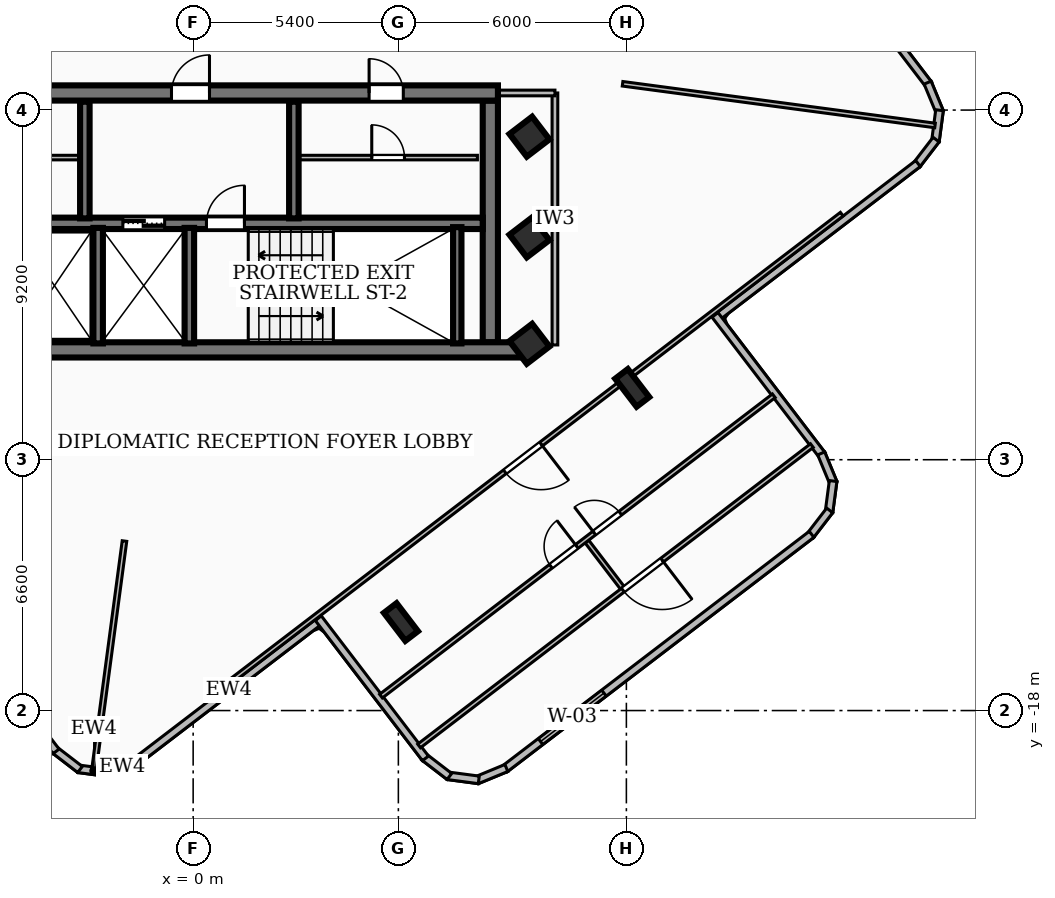
"""IFC4 building model, lengths in metres.
Left out: names, types, materials, properties, quantities, classifications, styles, units other than length and angle.
Written with IfcOpenShell. Run it as: python <this file> out.ifc"""

import sys

from ifc_helpers import new_model, si_unit, direction, frame, frame_2d, origin, origin_2d, place, context, subcontext, project, spatial, rectangle, i_section, extrude, element, fill, save


model = new_model("IFC4")
c1 = context("Model", 3, precision=1e-05, world=origin(), true_north=direction((0.0, 1.0)))
c2 = subcontext(c1, "Body", "Model", "MODEL_VIEW")
j1 = project(units=[si_unit("LENGTHUNIT", "METRE"), si_unit("PLANEANGLEUNIT", "RADIAN")], contexts=[c1])
p1 = place(None, origin())
s1 = spatial("IfcSite", under=j1, at=p1, CompositionType="ELEMENT")
p2 = place(p1, origin())
s2 = spatial("IfcBuilding", under=s1, at=p2, CompositionType="ELEMENT")
p3 = place(p2, frame((0.0, 0.0, 232.56)))
s3 = spatial("IfcBuildingStorey", under=s2, at=p3, CompositionType="ELEMENT", Elevation=232.56)
p4 = place(p3, frame((8.78, -8.51, 0.0), z_axis=(0.0, 0.0, 1.0), x_axis=(-1.0, 0.0, 0.0)))
e1 = element("IfcWall", 1, at=p4, inside=s3, PredefinedType="SHEAR", context=c2, shape_type="SweptSolid", body=[
    extrude(rectangle(XDim=17.56, YDim=0.4, at=frame_2d((8.78, 0.0))), origin(), (0.0, 0.0, 1.0), 3.14),
])
p5 = place(p3, frame((-8.02, -1.75, 0.0), z_axis=(0.0, 0.0, 1.0), x_axis=(1.0, 0.0, 0.0)))
e2 = element("IfcWall", 2, at=p5, inside=s3, PredefinedType="SHEAR", context=c2, shape_type="SweptSolid", body=[
    extrude(rectangle(XDim=16.04, YDim=0.4, at=frame_2d((8.02, 0.0))), origin(), (0.0, 0.0, 1.0), 3.14),
])
p6 = place(p5, frame((7.45, 0.0, 0.0)))
e3 = element("IfcOpeningElement", 3, at=p6, cuts=e2, PredefinedType="OPENING", context=c2, shape_type="SweptSolid", body=[
    extrude(rectangle(XDim=1.0, YDim=2.1, at=frame_2d((0.5, 1.05))), frame((0.0, 0.21, 0.0), z_axis=(0.0, -1.0, 0.0), x_axis=(1.0, 0.0, 0.0)), (0.0, 0.0, 1.0), 0.42),
])
p7 = place(p5, frame((12.65, 0.0, 0.0)))
e4 = element("IfcOpeningElement", 4, at=p7, cuts=e2, PredefinedType="OPENING", context=c2, shape_type="SweptSolid", body=[
    extrude(rectangle(XDim=0.9, YDim=2.06, at=frame_2d((0.45, 1.03))), frame((0.0, 0.21, 0.0), z_axis=(0.0, -1.0, 0.0), x_axis=(1.0, 0.0, 0.0)), (0.0, 0.0, 1.0), 0.42),
])
p8 = place(p5, frame((2.25, 0.0, 0.0)))
e5 = element("IfcOpeningElement", 5, at=p8, cuts=e2, PredefinedType="OPENING", context=c2, shape_type="SweptSolid", body=[
    extrude(rectangle(XDim=0.9, YDim=2.06, at=frame_2d((0.45, 1.03))), frame((0.0, 0.21, 0.0), z_axis=(0.0, -1.0, 0.0), x_axis=(1.0, 0.0, 0.0)), (0.0, 0.0, 1.0), 0.42),
])
p9 = place(p3, frame((7.82, -1.95, 0.0), z_axis=(0.0, 0.0, 1.0), x_axis=(0.0, -1.0, 0.0)))
e6 = element("IfcWall", 6, at=p9, inside=s3, PredefinedType="SHEAR", context=c2, shape_type="SweptSolid", body=[
    extrude(rectangle(XDim=6.36, YDim=0.4, at=frame_2d((3.18, 0.0))), origin(), (0.0, 0.0, 1.0), 3.14),
])
p10 = place(p3, frame((-7.62, -5.18, 0.0), z_axis=(0.0, 0.0, 1.0), x_axis=(1.0, 0.0, 0.0)))
e7 = element("IfcWall", 7, at=p10, inside=s3, PredefinedType="SOLIDWALL", context=c2, shape_type="SweptSolid", body=[
    extrude(rectangle(XDim=15.24, YDim=0.3, at=frame_2d((7.62, 0.0))), origin(), (0.0, 0.0, 1.0), 3.14),
])
p11 = place(p10, frame((5.77, 0.0, 0.0)))
e8 = element("IfcOpeningElement", 8, at=p11, cuts=e7, PredefinedType="OPENING", context=c2, shape_type="SweptSolid", body=[
    extrude(rectangle(XDim=1.1, YDim=2.15, at=frame_2d((0.55, 1.075))), frame((0.0, 0.16, 0.0), z_axis=(0.0, -1.0, 0.0), x_axis=(1.0, 0.0, 0.0)), (0.0, 0.0, 1.0), 0.32),
])
p12 = place(p10, frame((7.97, 0.0, 0.0)))
e9 = element("IfcOpeningElement", 9, at=p12, cuts=e7, PredefinedType="OPENING", context=c2, shape_type="SweptSolid", body=[
    extrude(rectangle(XDim=1.0, YDim=2.1, at=frame_2d((0.5, 1.05))), frame((0.0, 0.16, 0.0), z_axis=(0.0, -1.0, 0.0), x_axis=(1.0, 0.0, 0.0)), (0.0, 0.0, 1.0), 0.32),
])
p13 = place(p3, frame((6.95, -8.34, 0.0), z_axis=(0.0, 0.0, 1.0), x_axis=(0.0, 1.0, 0.0)))
e10 = element("IfcWall", 10, at=p13, inside=s3, PredefinedType="SOLIDWALL", context=c2, shape_type="SweptSolid", body=[
    extrude(rectangle(XDim=3.06, YDim=0.22, at=frame_2d((1.53, 0.0))), origin(), (0.0, 0.0, 1.0), 3.14),
])
for number, where, z_axis, x_axis in (
    (11, (-0.1, -8.34, 0.0), (0.0, 0.0, 1.0), (0.0, 1.0, 0.0)),
    (12, (-2.5, -8.34, 0.0), (0.0, 0.0, 1.0), (0.0, 1.0, 0.0)),
):
    element("IfcWall", number, at=place(p3, frame(where, z_axis=z_axis, x_axis=x_axis)), inside=s3, PredefinedType="SOLIDWALL", context=c2, shape_type="SweptSolid", body=[
        extrude(rectangle(XDim=3.04, YDim=0.25, at=frame_2d((1.52, 0.0))), origin(), (0.0, 0.0, 1.0), 3.14),
    ])
for number, where, z_axis, x_axis in (
    (13, (-2.85, -5.05, 0.0), (0.0, 0.0, 1.0), (0.0, 1.0, 0.0)),
    (14, (2.65, -5.05, 0.0), (0.0, 0.0, 1.0), (0.0, 1.0, 0.0)),
):
    element("IfcWall", number, at=place(p3, frame(where, z_axis=z_axis, x_axis=x_axis)), inside=s3, PredefinedType="SOLIDWALL", context=c2, shape_type="SweptSolid", body=[
        extrude(rectangle(XDim=3.07, YDim=0.25, at=frame_2d((1.535, 0.0))), origin(), (0.0, 0.0, 1.0), 3.14),
    ])
for number, where, z_axis, x_axis in (
    (15, (8.85, -5.55, 0.0), (0.0, 0.0, 1.0), (0.794, 0.607, 0.0)),
    (16, (8.85, -2.9, 0.0), (0.0, 0.0, 1.0), (0.794, 0.607, 0.0)),
    (17, (8.85, -8.35, 0.0), (0.0, 0.0, 1.0), (0.794, 0.607, 0.0)),
):
    element("IfcColumn", number, at=place(p3, frame(where, z_axis=z_axis, x_axis=x_axis)), inside=s3, PredefinedType="COLUMN", context=c2, shape_type="SweptSolid", body=[
        extrude(rectangle(XDim=0.75, YDim=0.75, at=origin_2d()), origin(), (0.0, 0.0, 1.0), 3.42),
    ])
for number, where, z_axis, x_axis in (
    (18, (5.468, -15.671, 0.0), (0.0, 0.0, 1.0), (0.794, 0.607, 0.0)),
    (19, (11.554, -9.51, 0.0), (0.0, 0.0, 1.0), (0.794, 0.607, 0.0)),
):
    element("IfcColumn", number, at=place(p3, frame(where, z_axis=z_axis, x_axis=x_axis)), inside=s3, PredefinedType="COLUMN", context=c2, shape_type="SweptSolid", body=[
        extrude(i_section(OverallWidth=0.418, OverallDepth=0.927, WebThickness=0.019, FlangeThickness=0.032, at=origin_2d()), origin(), (0.0, 0.0, 1.0), 3.42),
    ])
p14 = place(p3, frame((3.406, -15.584, 0.0), z_axis=(0.0, 0.0, 1.0), x_axis=(-0.794329901805, -0.60748663121, 0.0)))
e20 = element("IfcWall", 20, at=p14, inside=s3, PredefinedType="SOLIDWALL", context=c2, shape_type="SweptSolid", body=[
    extrude(rectangle(XDim=6.203, YDim=0.2, at=frame_2d((3.101, 0.0))), origin(), (0.0, 0.0, 1.0), 3.14),
])
p15 = place(p3, frame((-1.478, -19.327, 0.0), z_axis=(0.0, 0.0, 1.0), x_axis=(-0.924091394431, -0.382171551451, 0.0)))
e21 = element("IfcWall", 21, at=p15, inside=s3, PredefinedType="SOLIDWALL", context=c2, shape_type="SweptSolid", body=[
    extrude(rectangle(XDim=0.837, YDim=0.2, at=frame_2d((0.419, 0.0))), origin(), (0.0, 0.0, 1.0), 3.14),
])
p16 = place(p3, frame((-2.204, -19.64, 0.0), z_axis=(0.0, 0.0, 1.0), x_axis=(-0.99140789753, 0.130806653943, 0.0)))
e22 = element("IfcWall", 22, at=p16, inside=s3, PredefinedType="SOLIDWALL", context=c2, shape_type="SweptSolid", body=[
    extrude(rectangle(XDim=0.825, YDim=0.2, at=frame_2d((0.413, 0.0))), origin(), (0.0, 0.0, 1.0), 3.14),
])
p17 = place(p3, frame((-2.977, -19.55, 0.0), z_axis=(0.0, 0.0, 1.0), x_axis=(-0.792959338773, 0.609274558022, 0.0)))
e23 = element("IfcWall", 23, at=p17, inside=s3, PredefinedType="SOLIDWALL", context=c2, shape_type="SweptSolid", body=[
    extrude(rectangle(XDim=0.839, YDim=0.2, at=frame_2d((0.419, 0.0))), origin(), (0.0, 0.0, 1.0), 3.14),
])
p18 = place(p3, frame((-3.607, -19.074, 0.0), z_axis=(0.0, 0.0, 1.0), x_axis=(-0.607353275552, 0.794431871639, 0.0)))
e24 = element("IfcWall", 24, at=p18, inside=s3, PredefinedType="SOLIDWALL", context=c2, shape_type="SweptSolid", body=[
    extrude(rectangle(XDim=25.924, YDim=0.2, at=frame_2d((12.962, 0.0))), origin(), (0.0, 0.0, 1.0), 3.14),
])
p19 = place(p18, frame((19.321, 0.0, 0.85)))
e25 = element("IfcOpeningElement", 25, at=p19, cuts=e24, PredefinedType="OPENING", context=c2, shape_type="SweptSolid", body=[
    extrude(rectangle(XDim=1.8, YDim=1.6, at=frame_2d((0.9, 0.8))), frame((0.0, 0.11, 0.0), z_axis=(0.0, -1.0, 0.0), x_axis=(1.0, 0.0, 0.0)), (0.0, 0.0, 1.0), 0.22),
])
p20 = place(p3, frame((15.584, 3.406, 0.0), z_axis=(0.0, 0.0, 1.0), x_axis=(0.60748663121, -0.794329901805, 0.0)))
e26 = element("IfcWall", 26, at=p20, inside=s3, PredefinedType="SOLIDWALL", context=c2, shape_type="SweptSolid", body=[
    extrude(rectangle(XDim=6.203, YDim=0.2, at=frame_2d((3.101, 0.0))), origin(), (0.0, 0.0, 1.0), 3.14),
])
p21 = place(p3, frame((19.327, -1.478, 0.0), z_axis=(0.0, 0.0, 1.0), x_axis=(0.382171551451, -0.924091394431, 0.0)))
e27 = element("IfcWall", 27, at=p21, inside=s3, PredefinedType="SOLIDWALL", context=c2, shape_type="SweptSolid", body=[
    extrude(rectangle(XDim=0.837, YDim=0.2, at=frame_2d((0.419, 0.0))), origin(), (0.0, 0.0, 1.0), 3.14),
])
p22 = place(p3, frame((19.64, -2.204, 0.0), z_axis=(0.0, 0.0, 1.0), x_axis=(-0.130806653943, -0.99140789753, 0.0)))
e28 = element("IfcWall", 28, at=p22, inside=s3, PredefinedType="SOLIDWALL", context=c2, shape_type="SweptSolid", body=[
    extrude(rectangle(XDim=0.825, YDim=0.2, at=frame_2d((0.413, 0.0))), origin(), (0.0, 0.0, 1.0), 3.14),
])
p23 = place(p3, frame((19.55, -2.977, 0.0), z_axis=(0.0, 0.0, 1.0), x_axis=(-0.609274558022, -0.792959338773, 0.0)))
e29 = element("IfcWall", 29, at=p23, inside=s3, PredefinedType="SOLIDWALL", context=c2, shape_type="SweptSolid", body=[
    extrude(rectangle(XDim=0.839, YDim=0.2, at=frame_2d((0.419, 0.0))), origin(), (0.0, 0.0, 1.0), 3.14),
])
p24 = place(p3, frame((19.074, -3.607, 0.0), z_axis=(0.0, 0.0, 1.0), x_axis=(-0.794465731546, -0.607308983466, 0.0)))
e30 = element("IfcWall", 30, at=p24, inside=s3, PredefinedType="SOLIDWALL", context=c2, shape_type="SweptSolid", body=[
    extrude(rectangle(XDim=6.743, YDim=0.2, at=frame_2d((3.372, 0.0))), origin(), (0.0, 0.0, 1.0), 3.14),
])
p25 = place(p3, frame((13.732, -7.589, 0.0), z_axis=(0.0, 0.0, 1.0), x_axis=(0.607428636372, -0.794374251669, 0.0)))
e31 = element("IfcWall", 31, at=p25, inside=s3, PredefinedType="SOLIDWALL", context=c2, shape_type="SweptSolid", body=[
    extrude(rectangle(XDim=4.643, YDim=0.2, at=frame_2d((2.321, 0.0))), origin(), (0.0, 0.0, 1.0), 3.14),
])
p26 = place(p3, frame((16.527, -11.234, 0.0), z_axis=(0.0, 0.0, 1.0), x_axis=(0.381408676087, -0.924406524104, 0.0)))
e32 = element("IfcWall", 32, at=p26, inside=s3, PredefinedType="SOLIDWALL", context=c2, shape_type="SweptSolid", body=[
    extrude(rectangle(XDim=0.839, YDim=0.2, at=frame_2d((0.419, 0.0))), origin(), (0.0, 0.0, 1.0), 3.14),
])
p27 = place(p3, frame((16.84, -11.961, 0.0), z_axis=(0.0, 0.0, 1.0), x_axis=(-0.131059066172, -0.991374561492, 0.0)))
e33 = element("IfcWall", 33, at=p27, inside=s3, PredefinedType="SOLIDWALL", context=c2, shape_type="SweptSolid", body=[
    extrude(rectangle(XDim=0.825, YDim=0.2, at=frame_2d((0.413, 0.0))), origin(), (0.0, 0.0, 1.0), 3.14),
])
p28 = place(p3, frame((16.75, -12.734, 0.0), z_axis=(0.0, 0.0, 1.0), x_axis=(-0.609837482774, -0.792526494575, 0.0)))
e34 = element("IfcWall", 34, at=p28, inside=s3, PredefinedType="SOLIDWALL", context=c2, shape_type="SweptSolid", body=[
    extrude(rectangle(XDim=0.838, YDim=0.2, at=frame_2d((0.419, 0.0))), origin(), (0.0, 0.0, 1.0), 3.14),
])
p29 = place(p3, frame((16.274, -13.363, 0.0), z_axis=(0.0, 0.0, 1.0), x_axis=(-0.794458044917, -0.607319038781, 0.0)))
e35 = element("IfcWall", 35, at=p29, inside=s3, PredefinedType="SOLIDWALL", context=c2, shape_type="SweptSolid", body=[
    extrude(rectangle(XDim=10.164, YDim=0.2, at=frame_2d((5.082, 0.0))), origin(), (0.0, 0.0, 1.0), 3.14),
])
p30 = place(p29, frame((6.878, 0.0, 0.85)))
e36 = element("IfcOpeningElement", 36, at=p30, cuts=e35, PredefinedType="OPENING", context=c2, shape_type="SweptSolid", body=[
    extrude(rectangle(XDim=2.1, YDim=2.0, at=frame_2d((1.05, 1.0))), frame((0.0, 0.11, 0.0), z_axis=(0.0, -1.0, 0.0), x_axis=(1.0, 0.0, 0.0)), (0.0, 0.0, 1.0), 0.22),
])
p31 = place(p3, frame((8.242, -19.511, 0.0), z_axis=(0.0, 0.0, 1.0), x_axis=(-0.924091394431, -0.382171551451, 0.0)))
e37 = element("IfcWall", 37, at=p31, inside=s3, PredefinedType="SOLIDWALL", context=c2, shape_type="SweptSolid", body=[
    extrude(rectangle(XDim=0.837, YDim=0.2, at=frame_2d((0.419, 0.0))), origin(), (0.0, 0.0, 1.0), 3.14),
])
p32 = place(p3, frame((7.516, -19.824, 0.0), z_axis=(0.0, 0.0, 1.0), x_axis=(-0.991412958994, 0.130768286444, 0.0)))
e38 = element("IfcWall", 38, at=p32, inside=s3, PredefinedType="SOLIDWALL", context=c2, shape_type="SweptSolid", body=[
    extrude(rectangle(XDim=0.825, YDim=0.2, at=frame_2d((0.413, 0.0))), origin(), (0.0, 0.0, 1.0), 3.14),
])
p33 = place(p3, frame((6.743, -19.734, 0.0), z_axis=(0.0, 0.0, 1.0), x_axis=(-0.792959338773, 0.609274558022, 0.0)))
e39 = element("IfcWall", 39, at=p33, inside=s3, PredefinedType="SOLIDWALL", context=c2, shape_type="SweptSolid", body=[
    extrude(rectangle(XDim=0.839, YDim=0.2, at=frame_2d((0.419, 0.0))), origin(), (0.0, 0.0, 1.0), 3.14),
])
p34 = place(p3, frame((6.113, -19.258, 0.0), z_axis=(0.0, 0.0, 1.0), x_axis=(-0.607327150699, 0.794451843741, 0.0)))
e40 = element("IfcWall", 40, at=p34, inside=s3, PredefinedType="SOLIDWALL", context=c2, shape_type="SweptSolid", body=[
    extrude(rectangle(XDim=4.643, YDim=0.2, at=frame_2d((2.322, 0.0))), origin(), (0.0, 0.0, 1.0), 3.14),
])
p35 = place(p3, frame((2.8, -3.45, 0.0), z_axis=(0.0, 0.0, 1.0), x_axis=(1.0, 0.0, 0.0)))
e41 = element("IfcWall", 41, at=p35, inside=s3, PredefinedType="PARTITIONING", context=c2, shape_type="SweptSolid", body=[
    extrude(rectangle(XDim=4.68, YDim=0.12, at=frame_2d((2.34, 0.0))), origin(), (0.0, 0.0, 1.0), 3.14),
])
p36 = place(p35, frame((1.9, 0.0, 0.0)))
e42 = element("IfcOpeningElement", 42, at=p36, cuts=e41, PredefinedType="OPENING", context=c2, shape_type="SweptSolid", body=[
    extrude(rectangle(XDim=0.86, YDim=2.04, at=frame_2d((0.43, 1.02))), frame((0.0, 0.07, 0.0), z_axis=(0.0, -1.0, 0.0), x_axis=(1.0, 0.0, 0.0)), (0.0, 0.0, 1.0), 0.14),
])
p37 = place(p3, frame((-7.52, -3.45, 0.0), z_axis=(0.0, 0.0, 1.0), x_axis=(1.0, 0.0, 0.0)))
e43 = element("IfcWall", 43, at=p37, inside=s3, PredefinedType="PARTITIONING", context=c2, shape_type="SweptSolid", body=[
    extrude(rectangle(XDim=4.54, YDim=0.12, at=frame_2d((2.27, 0.0))), origin(), (0.0, 0.0, 1.0), 3.14),
])
p38 = place(p37, frame((1.84, 0.0, 0.0)))
e44 = element("IfcOpeningElement", 44, at=p38, cuts=e43, PredefinedType="OPENING", context=c2, shape_type="SweptSolid", body=[
    extrude(rectangle(XDim=0.86, YDim=2.04, at=frame_2d((0.43, 1.02))), frame((0.0, 0.07, 0.0), z_axis=(0.0, -1.0, 0.0), x_axis=(1.0, 0.0, 0.0)), (0.0, 0.0, 1.0), 0.14),
])
p39 = place(p3, frame((9.52, -8.38, 0.0), z_axis=(0.0, 0.0, 1.0), x_axis=(0.0, 1.0, 0.0)))
e45 = element("IfcWall", 45, at=p39, inside=s3, PredefinedType="PARTITIONING", context=c2, shape_type="SweptSolid", body=[
    extrude(rectangle(XDim=6.63, YDim=0.15, at=frame_2d((3.315, 0.0))), origin(), (0.0, 0.0, 1.0), 3.14),
])
p40 = place(p3, frame((7.85, -1.75, 0.0), z_axis=(0.0, 0.0, 1.0), x_axis=(1.0, 0.0, 0.0)))
e46 = element("IfcWall", 46, at=p40, inside=s3, PredefinedType="PARTITIONING", context=c2, shape_type="SweptSolid", body=[
    extrude(rectangle(XDim=1.67, YDim=0.15, at=frame_2d((0.835, 0.0))), origin(), (0.0, 0.0, 1.0), 2.37),
])
p41 = place(p3, frame((-1.807, -13.54, 0.0), z_axis=(0.0, 0.0, 1.0), x_axis=(-0.132245865303, -0.991216944523, 0.0)))
e47 = element("IfcWall", 47, at=p41, inside=s3, PredefinedType="PARTITIONING", context=c2, shape_type="SweptSolid", body=[
    extrude(rectangle(XDim=6.035, YDim=0.12, at=frame_2d((3.018, 0.0))), origin(), (0.0, 0.0, 1.0), 3.14),
])
p42 = place(p3, frame((11.3, -1.508, 0.0), z_axis=(0.0, 0.0, 1.0), x_axis=(0.99121735818, -0.132242764804, 0.0)))
e48 = element("IfcWall", 48, at=p42, inside=s3, PredefinedType="PARTITIONING", context=c2, shape_type="SweptSolid", body=[
    extrude(rectangle(XDim=8.295, YDim=0.12, at=frame_2d((4.147, 0.0))), origin(), (0.0, 0.0, 1.0), 3.14),
])
p43 = place(p3, frame((17.068, -4.939, 0.0), z_axis=(0.0, 0.0, 1.0), x_axis=(-0.794433927634, -0.607350586255, 0.0)))
e49 = element("IfcWall", 49, at=p43, inside=s3, PredefinedType="PARTITIONING", context=c2, shape_type="SweptSolid", body=[
    extrude(rectangle(XDim=20.58, YDim=0.12, at=frame_2d((10.29, 0.0))), origin(), (0.0, 0.0, 1.0), 2.51),
])
p44 = place(p43, frame((9.96, 0.0, 0.0)))
e50 = element("IfcOpeningElement", 50, at=p44, cuts=e49, PredefinedType="OPENING", context=c2, shape_type="SweptSolid", body=[
    extrude(rectangle(XDim=1.2, YDim=2.1, at=frame_2d((0.6, 1.05))), frame((0.0, 0.07, 0.0), z_axis=(0.0, -1.0, 0.0), x_axis=(1.0, 0.0, 0.0)), (0.0, 0.0, 1.0), 0.14),
])
p45 = place(p3, frame((10.362, -13.553, 0.0), z_axis=(0.0, 0.0, 1.0), x_axis=(0.6073553069, -0.794430318644, 0.0)))
e51 = element("IfcWall", 51, at=p45, inside=s3, PredefinedType="PARTITIONING", context=c2, shape_type="SweptSolid", body=[
    extrude(rectangle(XDim=1.53, YDim=0.12, at=frame_2d((0.765, 0.0))), origin(), (0.0, 0.0, 1.0), 3.14),
])
p46 = place(p3, frame((4.943, -17.62, 0.0), z_axis=(0.0, 0.0, 1.0), x_axis=(0.79442653656, 0.607360253893, 0.0)))
e52 = element("IfcWall", 52, at=p46, inside=s3, PredefinedType="PARTITIONING", context=c2, shape_type="SweptSolid", body=[
    extrude(rectangle(XDim=13.01, YDim=0.12, at=frame_2d((6.505, 0.0))), origin(), (0.0, 0.0, 1.0), 3.14),
])
p47 = place(p46, frame((5.625, 0.0, 0.0)))
e53 = element("IfcOpeningElement", 53, at=p47, cuts=e52, PredefinedType="OPENING", context=c2, shape_type="SweptSolid", body=[
    extrude(rectangle(XDim=0.86, YDim=2.04, at=frame_2d((0.43, 1.02))), frame((0.0, 0.07, 0.0), z_axis=(0.0, -1.0, 0.0), x_axis=(1.0, 0.0, 0.0)), (0.0, 0.0, 1.0), 0.14),
])
p48 = place(p46, frame((7.065, 0.0, 0.0)))
e54 = element("IfcOpeningElement", 54, at=p48, cuts=e52, PredefinedType="OPENING", context=c2, shape_type="SweptSolid", body=[
    extrude(rectangle(XDim=0.86, YDim=2.04, at=frame_2d((0.43, 1.02))), frame((0.0, 0.07, 0.0), z_axis=(0.0, -1.0, 0.0), x_axis=(1.0, 0.0, 0.0)), (0.0, 0.0, 1.0), 0.14),
])
p49 = place(p3, frame((16.281, -11.029, 0.0), z_axis=(0.0, 0.0, 1.0), x_axis=(-0.794435590649, -0.607348410973, 0.0)))
e55 = element("IfcWall", 55, at=p49, inside=s3, PredefinedType="PARTITIONING", context=c2, shape_type="SweptSolid", body=[
    extrude(rectangle(XDim=13.01, YDim=0.12, at=frame_2d((6.505, 0.0))), origin(), (0.0, 0.0, 1.0), 3.14),
])
p50 = place(p49, frame((4.96, 0.0, 0.0)))
e56 = element("IfcOpeningElement", 56, at=p50, cuts=e55, PredefinedType="OPENING", context=c2, shape_type="SweptSolid", body=[
    extrude(rectangle(XDim=1.3, YDim=2.1, at=frame_2d((0.65, 1.05))), frame((0.0, 0.07, 0.0), z_axis=(0.0, -1.0, 0.0), x_axis=(1.0, 0.0, 0.0)), (0.0, 0.0, 1.0), 0.14),
])
p51 = place(p30, origin())
e57 = element("IfcWindow", 57, at=p51, inside=s3, PartitioningType="SINGLE_PANEL", PredefinedType="WINDOW", context=c2, shape_type="SweptSolid", body=[
    extrude(rectangle(XDim=2.1, YDim=2.0, at=frame_2d((1.05, 1.0))), frame((0.0, 0.03, 0.0), z_axis=(0.0, -1.0, 0.0), x_axis=(1.0, 0.0, 0.0)), (0.0, 0.0, 1.0), 0.06),
])
fill(e36, e57)
p52 = place(p6, origin())
e58 = element("IfcDoor", 58, at=p52, inside=s3, OperationType="SINGLE_SWING_RIGHT", PredefinedType="DOOR", context=c2, shape_type="SweptSolid", body=[
    extrude(rectangle(XDim=1.0, YDim=2.1, at=frame_2d((0.5, 1.05))), frame((0.0, 0.025, 0.0), z_axis=(0.0, -1.0, 0.0), x_axis=(1.0, 0.0, 0.0)), (0.0, 0.0, 1.0), 0.05),
])
fill(e3, e58)
p53 = place(p11, origin())
e59 = element("IfcDoor", 59, at=p53, inside=s3, OperationType="DOUBLE_DOOR_SLIDING", PredefinedType="DOOR", context=c2, shape_type="SweptSolid", body=[
    extrude(rectangle(XDim=1.1, YDim=2.15, at=frame_2d((0.55, 1.075))), frame((0.0, 0.025, 0.0), z_axis=(0.0, -1.0, 0.0), x_axis=(1.0, 0.0, 0.0)), (0.0, 0.0, 1.0), 0.05),
])
fill(e8, e59)
p54 = place(p12, origin())
e60 = element("IfcDoor", 60, at=p54, inside=s3, OperationType="SINGLE_SWING_RIGHT", PredefinedType="DOOR", context=c2, shape_type="SweptSolid", body=[
    extrude(rectangle(XDim=1.0, YDim=2.1, at=frame_2d((0.5, 1.05))), frame((0.0, 0.025, 0.0), z_axis=(0.0, -1.0, 0.0), x_axis=(1.0, 0.0, 0.0)), (0.0, 0.0, 1.0), 0.05),
])
fill(e9, e60)
p55 = place(p7, origin())
e61 = element("IfcDoor", 61, at=p55, inside=s3, OperationType="SINGLE_SWING_LEFT", PredefinedType="DOOR", context=c2, shape_type="SweptSolid", body=[
    extrude(rectangle(XDim=0.9, YDim=2.06, at=frame_2d((0.45, 1.03))), frame((0.0, 0.025, 0.0), z_axis=(0.0, -1.0, 0.0), x_axis=(1.0, 0.0, 0.0)), (0.0, 0.0, 1.0), 0.05),
])
fill(e4, e61)
p56 = place(p36, origin())
e62 = element("IfcDoor", 62, at=p56, inside=s3, OperationType="SINGLE_SWING_LEFT", PredefinedType="DOOR", context=c2, shape_type="SweptSolid", body=[
    extrude(rectangle(XDim=0.86, YDim=2.04, at=frame_2d((0.43, 1.02))), frame((0.0, 0.025, 0.0), z_axis=(0.0, -1.0, 0.0), x_axis=(1.0, 0.0, 0.0)), (0.0, 0.0, 1.0), 0.05),
])
fill(e42, e62)
p57 = place(p44, origin())
e63 = element("IfcDoor", 63, at=p57, inside=s3, OperationType="SINGLE_SWING_LEFT", PredefinedType="DOOR", context=c2, shape_type="SweptSolid", body=[
    extrude(rectangle(XDim=1.2, YDim=2.1, at=frame_2d((0.6, 1.05))), frame((0.0, 0.025, 0.0), z_axis=(0.0, -1.0, 0.0), x_axis=(1.0, 0.0, 0.0)), (0.0, 0.0, 1.0), 0.05),
])
fill(e50, e63)
p58 = place(p47, origin())
e64 = element("IfcDoor", 64, at=p58, inside=s3, OperationType="SINGLE_SWING_RIGHT", PredefinedType="DOOR", context=c2, shape_type="SweptSolid", body=[
    extrude(rectangle(XDim=0.86, YDim=2.04, at=frame_2d((0.43, 1.02))), frame((0.0, 0.025, 0.0), z_axis=(0.0, -1.0, 0.0), x_axis=(1.0, 0.0, 0.0)), (0.0, 0.0, 1.0), 0.05),
])
fill(e53, e64)
p59 = place(p48, origin())
e65 = element("IfcDoor", 65, at=p59, inside=s3, OperationType="SINGLE_SWING_LEFT", PredefinedType="DOOR", context=c2, shape_type="SweptSolid", body=[
    extrude(rectangle(XDim=0.86, YDim=2.04, at=frame_2d((0.43, 1.02))), frame((0.0, 0.025, 0.0), z_axis=(0.0, -1.0, 0.0), x_axis=(1.0, 0.0, 0.0)), (0.0, 0.0, 1.0), 0.05),
])
fill(e54, e65)
p60 = place(p50, origin())
e66 = element("IfcDoor", 66, at=p60, inside=s3, OperationType="SINGLE_SWING_LEFT", PredefinedType="DOOR", context=c2, shape_type="SweptSolid", body=[
    extrude(rectangle(XDim=1.3, YDim=2.1, at=frame_2d((0.65, 1.05))), frame((0.0, 0.025, 0.0), z_axis=(0.0, -1.0, 0.0), x_axis=(1.0, 0.0, 0.0)), (0.0, 0.0, 1.0), 0.05),
])
fill(e56, e66)
save(model, sys.argv[1])
